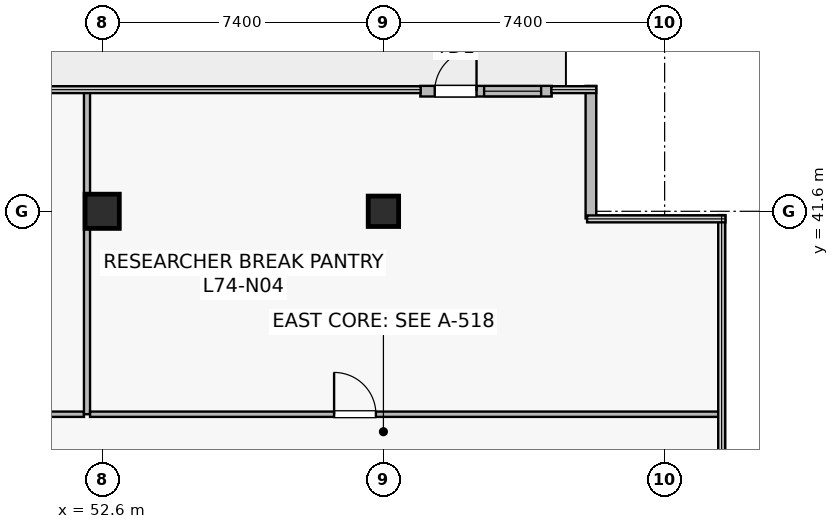
"""IFC4 building model, lengths in metres.
Left out: names, types, materials, properties, quantities, classifications, styles, units other than length and angle.
Written with IfcOpenShell. Run it as: python <this file> out.ifc"""

import sys

from ifc_helpers import new_model, si_unit, direction, frame, frame_2d, origin, origin_2d, place, context, subcontext, project, spatial, rectangle, extrude, source, transform, mapped, element, fill, save


model = new_model("IFC4")
c1 = context("Model", 3, precision=1e-05, world=origin(), true_north=direction((0.0, 1.0)))
c2 = subcontext(c1, "Body", "Model", "MODEL_VIEW")
j1 = project(units=[si_unit("LENGTHUNIT", "METRE"), si_unit("PLANEANGLEUNIT", "RADIAN")], contexts=[c1])
p1 = place(None, origin())
s1 = spatial("IfcSite", under=j1, at=p1, CompositionType="ELEMENT")
p2 = place(p1, origin())
s2 = spatial("IfcBuilding", under=s1, at=p2, CompositionType="ELEMENT")
p3 = place(p2, frame((0.0, 0.0, 310.2)))
s3 = spatial("IfcBuildingStorey", under=s2, at=p3, CompositionType="ELEMENT", Elevation=310.2)
m1 = source(origin(), c2, "Body", "SweptSolid", [
    extrude(rectangle(XDim=0.9, YDim=0.9, at=origin_2d()), origin(), (0.0, 0.0, 1.0), 4.2),
])
p4 = place(p3, frame((52.6, 41.6, 0.0), z_axis=(0.0, 0.0, 1.0), x_axis=(1.0, 0.0, 0.0)))
e1 = element("IfcColumn", 1, at=p4, inside=s3, PredefinedType="COLUMN", context=c2, shape_type="MappedRepresentation", body=[
    mapped(m1, transform((0.0, 0.0, 0.0), scale=1.0)),
])
m2 = source(origin(), c2, "Body", "SweptSolid", [
    extrude(rectangle(XDim=0.8, YDim=0.8, at=origin_2d()), origin(), (0.0, 0.0, 1.0), 4.2),
])
p5 = place(p3, frame((60.0, 41.6, 0.0), z_axis=(0.0, 0.0, 1.0), x_axis=(1.0, 0.0, 0.0)))
e2 = element("IfcColumn", 2, at=p5, inside=s3, PredefinedType="COLUMN", context=c2, shape_type="MappedRepresentation", body=[
    mapped(m2, transform((0.0, 0.0, 0.0), scale=1.0)),
])
p6 = place(p3, frame((60.972, 44.76, 0.0), z_axis=(0.0, 0.0, 1.0), x_axis=(1.0, 0.0, 0.0)))
e3 = element("IfcWall", 3, at=p6, inside=s3, PredefinedType="STANDARD", context=c2, shape_type="SweptSolid", body=[
    extrude(rectangle(XDim=3.456, YDim=0.28, at=frame_2d((1.728, 0.0))), origin(), (0.0, 0.0, 1.0), 3.9),
])
p7 = place(p6, frame((0.378, 0.0, 0.0)))
e4 = element("IfcOpeningElement", 4, at=p7, cuts=e3, PredefinedType="OPENING", context=c2, shape_type="SweptSolid", body=[
    extrude(rectangle(XDim=1.1, YDim=2.2, at=frame_2d((0.55, 1.1))), frame((0.0, 0.15, 0.0), z_axis=(0.0, -1.0, 0.0), x_axis=(1.0, 0.0, 0.0)), (0.0, 0.0, 1.0), 0.3),
])
p8 = place(p6, frame((1.678, 0.0, 0.9)))
e5 = element("IfcOpeningElement", 5, at=p8, cuts=e3, PredefinedType="OPENING", context=c2, shape_type="SweptSolid", body=[
    extrude(rectangle(XDim=1.5, YDim=2.2, at=frame_2d((0.75, 1.1))), frame((0.0, 0.15, 0.0), z_axis=(0.0, -1.0, 0.0), x_axis=(1.0, 0.0, 0.0)), (0.0, 0.0, 1.0), 0.3),
])
p9 = place(p3, frame((65.46, 41.412, 0.0), z_axis=(0.0, 0.0, 1.0), x_axis=(0.0, 1.0, 0.0)))
e6 = element("IfcWall", 6, at=p9, inside=s3, PredefinedType="STANDARD", context=c2, shape_type="SweptSolid", body=[
    extrude(rectangle(XDim=3.488, YDim=0.28, at=frame_2d((1.744, 0.0))), origin(), (0.0, 0.0, 1.0), 3.9),
])
p10 = place(p3, frame((34.88, 36.26, 0.0), z_axis=(0.0, 0.0, 1.0), x_axis=(1.0, 0.0, 0.0)))
e7 = element("IfcWall", 7, at=p10, inside=s3, PredefinedType="PARTITIONING", context=c2, shape_type="SweptSolid", body=[
    extrude(rectangle(XDim=17.24, YDim=0.14, at=frame_2d((8.62, 0.0))), origin(), (0.0, 0.0, 1.0), 3.297),
])
p11 = place(p10, frame((8.533, 0.0, 0.0)))
e8 = element("IfcOpeningElement", 8, at=p11, cuts=e7, PredefinedType="OPENING", context=c2, shape_type="SweptSolid", body=[
    extrude(rectangle(XDim=1.1, YDim=2.18, at=frame_2d((0.55, 1.09))), frame((0.0, 0.08, 0.0), z_axis=(0.0, -1.0, 0.0), x_axis=(1.0, 0.0, 0.0)), (0.0, 0.0, 1.0), 0.16),
])
p12 = place(p3, frame((52.2, 36.26, 0.0), z_axis=(0.0, 0.0, 1.0), x_axis=(0.0, 1.0, 0.0)))
e9 = element("IfcWall", 9, at=p12, inside=s3, PredefinedType="PARTITIONING", context=c2, shape_type="SweptSolid", body=[
    extrude(rectangle(XDim=8.53, YDim=0.16, at=frame_2d((4.265, 0.0))), origin(), (0.0, 0.0, 1.0), 2.985),
])
p13 = place(p3, frame((52.28, 36.26, 0.0), z_axis=(0.0, 0.0, 1.0), x_axis=(1.0, 0.0, 0.0)))
e10 = element("IfcWall", 10, at=p13, inside=s3, PredefinedType="PARTITIONING", context=c2, shape_type="SweptSolid", body=[
    extrude(rectangle(XDim=16.61, YDim=0.14, at=frame_2d((8.305, 0.0))), origin(), (0.0, 0.0, 1.0), 3.297),
])
p14 = place(p13, frame((6.422, 0.0, 0.0)))
e11 = element("IfcOpeningElement", 11, at=p14, cuts=e10, PredefinedType="OPENING", context=c2, shape_type="SweptSolid", body=[
    extrude(rectangle(XDim=1.1, YDim=2.18, at=frame_2d((0.55, 1.09))), frame((0.0, 0.08, 0.0), z_axis=(0.0, -1.0, 0.0), x_axis=(1.0, 0.0, 0.0)), (0.0, 0.0, 1.0), 0.16),
])
m3 = source(origin(), c2, "Body", "SweptSolid", [
    extrude(rectangle(XDim=1.1, YDim=2.2, at=frame_2d((0.55, 1.1))), frame((0.0, 0.025, 0.0), z_axis=(0.0, -1.0, 0.0), x_axis=(1.0, 0.0, 0.0)), (0.0, 0.0, 1.0), 0.05),
])
p15 = place(p7, origin())
e12 = element("IfcDoor", 12, at=p15, inside=s3, OperationType="SINGLE_SWING_RIGHT", PredefinedType="DOOR", context=c2, shape_type="MappedRepresentation", body=[
    mapped(m3, transform((0.0, 0.0, 0.0), scale=1.0)),
])
fill(e4, e12)
m4 = source(origin(), c2, "Body", "SweptSolid", [
    extrude(rectangle(XDim=1.5, YDim=2.2, at=frame_2d((0.75, 1.1))), frame((0.0, 0.03, 0.0), z_axis=(0.0, -1.0, 0.0), x_axis=(1.0, 0.0, 0.0)), (0.0, 0.0, 1.0), 0.06),
])
p16 = place(p8, origin())
e13 = element("IfcWindow", 13, at=p16, inside=s3, PartitioningType="SINGLE_PANEL", PredefinedType="WINDOW", context=c2, shape_type="MappedRepresentation", body=[
    mapped(m4, transform((0.0, 0.0, 0.0), scale=1.0)),
])
fill(e5, e13)
m5 = source(origin(), c2, "Body", "SweptSolid", [
    extrude(rectangle(XDim=1.1, YDim=2.18, at=frame_2d((0.55, 1.09))), frame((0.0, 0.025, 0.0), z_axis=(0.0, -1.0, 0.0), x_axis=(1.0, 0.0, 0.0)), (0.0, 0.0, 1.0), 0.05),
])
p17 = place(p14, origin())
e14 = element("IfcDoor", 14, at=p17, inside=s3, OperationType="SINGLE_SWING_LEFT", PredefinedType="DOOR", context=c2, shape_type="MappedRepresentation", body=[
    mapped(m5, transform((0.0, 0.0, 0.0), scale=1.0)),
])
fill(e11, e14)
save(model, sys.argv[1])
